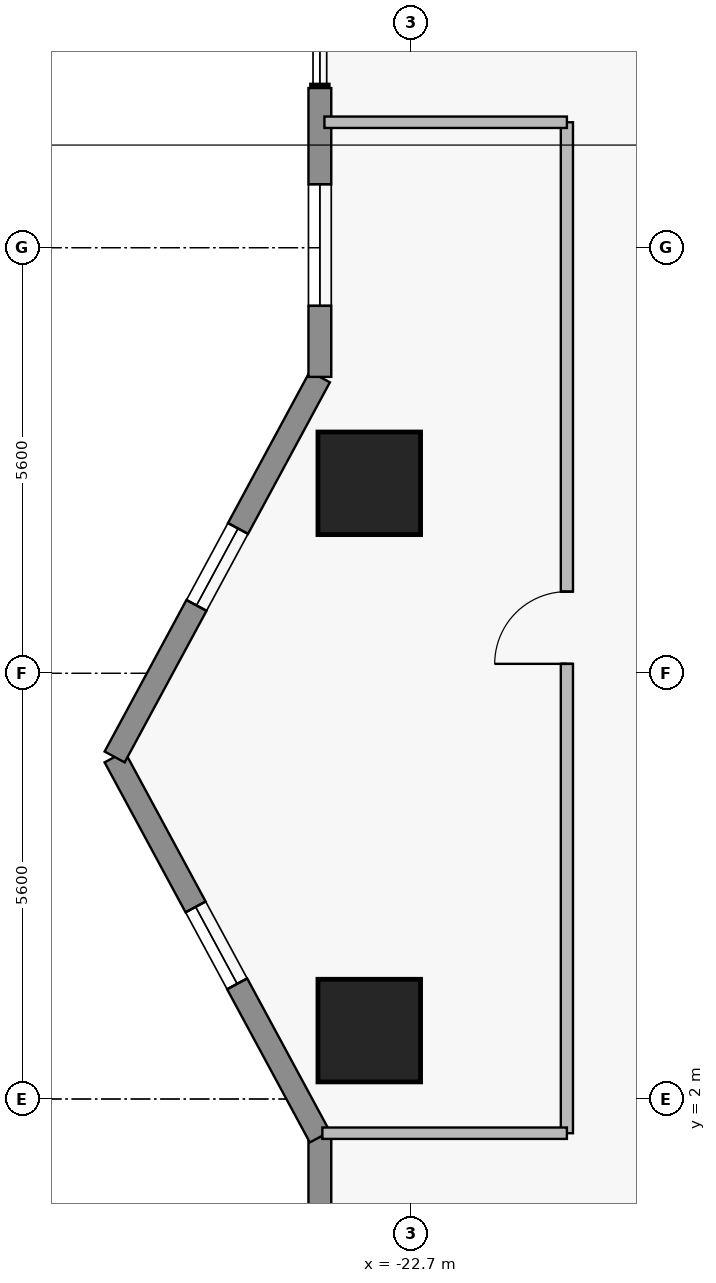
"""IFC4 building model, lengths in metres.
Left out: names, types, materials, properties, quantities, classifications, styles, units other than length and angle.
Written with IfcOpenShell. Run it as: python <this file> out.ifc"""

import sys

from ifc_helpers import new_model, si_unit, direction, frame, frame_2d, origin, origin_2d, place, context, subcontext, project, spatial, rectangle, extrude, element, fill, save


model = new_model("IFC4")
c1 = context("Model", 3, precision=1e-05, world=origin(), true_north=direction((0.0, 1.0)))
c2 = subcontext(c1, "Body", "Model", "MODEL_VIEW")
j1 = project(units=[si_unit("LENGTHUNIT", "METRE"), si_unit("PLANEANGLEUNIT", "RADIAN")], contexts=[c1])
p1 = place(None, origin())
s1 = spatial("IfcSite", under=j1, at=p1, CompositionType="ELEMENT")
p2 = place(p1, origin())
s2 = spatial("IfcBuilding", under=s1, at=p2, CompositionType="ELEMENT")
p3 = place(p2, frame((0.0, 0.0, 128.5)))
s3 = spatial("IfcBuildingStorey", under=s2, at=p3, CompositionType="ELEMENT", Elevation=128.5)
for number, where, z_axis, x_axis in (
    (1, (-23.25, 2.9, 0.0), (0.0, 0.0, 1.0), (1.0, 0.0, 0.0)),
    (2, (-23.25, 10.1, 0.0), (0.0, 0.0, 1.0), (1.0, 0.0, 0.0)),
):
    element("IfcColumn", number, at=place(p3, frame(where, z_axis=z_axis, x_axis=x_axis)), inside=s3, PredefinedType="COLUMN", context=c2, shape_type="SweptSolid", body=[
        extrude(rectangle(XDim=1.35, YDim=1.35, at=origin_2d()), origin(), (0.0, 0.0, 1.0), 3.65),
    ])
p4 = place(p3, frame((-23.9, 0.35, 0.0), z_axis=(0.0, 0.0, 1.0), x_axis=(0.0, 1.0, 0.0)))
e3 = element("IfcWall", 3, at=p4, inside=s3, PredefinedType="STANDARD", context=c2, shape_type="SweptSolid", body=[
    extrude(rectangle(XDim=1.15, YDim=0.3, at=frame_2d((0.575, 0.0))), origin(), (0.0, 0.0, 1.0), 3.43),
])
p5 = place(p3, frame((-23.9, 1.5, 0.0), z_axis=(0.0, 0.0, 1.0), x_axis=(-0.475175525499, 0.879891027325, 0.0)))
e4 = element("IfcWall", 4, at=p5, inside=s3, PredefinedType="STANDARD", context=c2, shape_type="SweptSolid", body=[
    extrude(rectangle(XDim=5.683, YDim=0.3, at=frame_2d((2.841, 0.0))), origin(), (0.0, 0.0, 1.0), 3.43),
])
p6 = place(p5, frame((2.29, 0.0, 1.25)))
e5 = element("IfcOpeningElement", 5, at=p6, cuts=e4, PredefinedType="OPENING", context=c2, shape_type="SweptSolid", body=[
    extrude(rectangle(XDim=1.15, YDim=1.55, at=frame_2d((0.575, 0.775))), frame((0.0, 0.16, 0.0), z_axis=(0.0, -1.0, 0.0), x_axis=(1.0, 0.0, 0.0)), (0.0, 0.0, 1.0), 0.32),
])
p7 = place(p3, frame((-26.6, 6.5, 0.0), z_axis=(0.0, 0.0, 1.0), x_axis=(0.475175525499, 0.879891027325, 0.0)))
e6 = element("IfcWall", 6, at=p7, inside=s3, PredefinedType="STANDARD", context=c2, shape_type="SweptSolid", body=[
    extrude(rectangle(XDim=5.683, YDim=0.3, at=frame_2d((2.841, 0.0))), origin(), (0.0, 0.0, 1.0), 3.43),
])
p8 = place(p7, frame((2.266, 0.0, 1.25)))
e7 = element("IfcOpeningElement", 7, at=p8, cuts=e6, PredefinedType="OPENING", context=c2, shape_type="SweptSolid", body=[
    extrude(rectangle(XDim=1.15, YDim=1.55, at=frame_2d((0.575, 0.775))), frame((0.0, 0.16, 0.0), z_axis=(0.0, -1.0, 0.0), x_axis=(1.0, 0.0, 0.0)), (0.0, 0.0, 1.0), 0.32),
])
p9 = place(p3, frame((-23.9, 11.5, 0.0), z_axis=(0.0, 0.0, 1.0), x_axis=(0.0, 1.0, 0.0)))
e8 = element("IfcWall", 8, at=p9, inside=s3, PredefinedType="STANDARD", context=c2, shape_type="SweptSolid", body=[
    extrude(rectangle(XDim=3.8, YDim=0.3, at=frame_2d((1.9, 0.0))), origin(), (0.0, 0.0, 1.0), 3.43),
])
p10 = place(p9, frame((0.935, 0.0, 0.85)))
e9 = element("IfcOpeningElement", 9, at=p10, cuts=e8, PredefinedType="OPENING", context=c2, shape_type="SweptSolid", body=[
    extrude(rectangle(XDim=1.6, YDim=1.8, at=frame_2d((0.8, 0.9))), frame((0.0, 0.16, 0.0), z_axis=(0.0, -1.0, 0.0), x_axis=(1.0, 0.0, 0.0)), (0.0, 0.0, 1.0), 0.32),
])
p11 = place(p3, frame((-20.65, 1.55, 0.0), z_axis=(0.0, 0.0, 1.0), x_axis=(0.0, 1.0, 0.0)))
e10 = element("IfcWall", 10, at=p11, inside=s3, PredefinedType="PARTITIONING", context=c2, shape_type="SweptSolid", body=[
    extrude(rectangle(XDim=13.3, YDim=0.16, at=frame_2d((6.65, 0.0))), origin(), (0.0, 0.0, 1.0), 3.43),
])
p12 = place(p11, frame((6.175, 0.0, 0.0)))
e11 = element("IfcOpeningElement", 11, at=p12, cuts=e10, PredefinedType="OPENING", context=c2, shape_type="SweptSolid", body=[
    extrude(rectangle(XDim=0.95, YDim=2.15, at=frame_2d((0.475, 1.075))), frame((0.0, 0.09, 0.0), z_axis=(0.0, -1.0, 0.0), x_axis=(1.0, 0.0, 0.0)), (0.0, 0.0, 1.0), 0.18),
])
p13 = place(p3, frame((-23.867, 1.55, 0.0), z_axis=(0.0, 0.0, 1.0), x_axis=(1.0, 0.0, 0.0)))
e12 = element("IfcWall", 12, at=p13, inside=s3, PredefinedType="PARTITIONING", context=c2, shape_type="SweptSolid", body=[
    extrude(rectangle(XDim=3.217, YDim=0.15, at=frame_2d((1.608, 0.0))), origin(), (0.0, 0.0, 1.0), 3.43),
])
p14 = place(p3, frame((-23.84, 14.85, 0.0), z_axis=(0.0, 0.0, 1.0), x_axis=(1.0, 0.0, 0.0)))
e13 = element("IfcWall", 13, at=p14, inside=s3, PredefinedType="PARTITIONING", context=c2, shape_type="SweptSolid", body=[
    extrude(rectangle(XDim=3.19, YDim=0.15, at=frame_2d((1.595, 0.0))), origin(), (0.0, 0.0, 1.0), 3.43),
])
p15 = place(p6, origin())
e14 = element("IfcWindow", 14, at=p15, inside=s3, PartitioningType="SINGLE_PANEL", PredefinedType="WINDOW", context=c2, shape_type="SweptSolid", body=[
    extrude(rectangle(XDim=1.15, YDim=1.55, at=frame_2d((0.575, 0.775))), frame((0.0, 0.03, 0.0), z_axis=(0.0, -1.0, 0.0), x_axis=(1.0, 0.0, 0.0)), (0.0, 0.0, 1.0), 0.06),
])
fill(e5, e14)
p16 = place(p8, origin())
e15 = element("IfcWindow", 15, at=p16, inside=s3, PartitioningType="SINGLE_PANEL", PredefinedType="WINDOW", context=c2, shape_type="SweptSolid", body=[
    extrude(rectangle(XDim=1.15, YDim=1.55, at=frame_2d((0.575, 0.775))), frame((0.0, 0.03, 0.0), z_axis=(0.0, -1.0, 0.0), x_axis=(1.0, 0.0, 0.0)), (0.0, 0.0, 1.0), 0.06),
])
fill(e7, e15)
p17 = place(p10, origin())
e16 = element("IfcWindow", 16, at=p17, inside=s3, PartitioningType="SINGLE_PANEL", PredefinedType="WINDOW", context=c2, shape_type="SweptSolid", body=[
    extrude(rectangle(XDim=1.6, YDim=1.8, at=frame_2d((0.8, 0.9))), frame((0.0, 0.03, 0.0), z_axis=(0.0, -1.0, 0.0), x_axis=(1.0, 0.0, 0.0)), (0.0, 0.0, 1.0), 0.06),
])
fill(e9, e16)
p18 = place(p12, origin())
e17 = element("IfcDoor", 17, at=p18, inside=s3, OperationType="SINGLE_SWING_LEFT", PredefinedType="DOOR", context=c2, shape_type="SweptSolid", body=[
    extrude(rectangle(XDim=0.95, YDim=2.15, at=frame_2d((0.475, 1.075))), frame((0.0, 0.025, 0.0), z_axis=(0.0, -1.0, 0.0), x_axis=(1.0, 0.0, 0.0)), (0.0, 0.0, 1.0), 0.05),
])
fill(e11, e17)
save(model, sys.argv[1])
